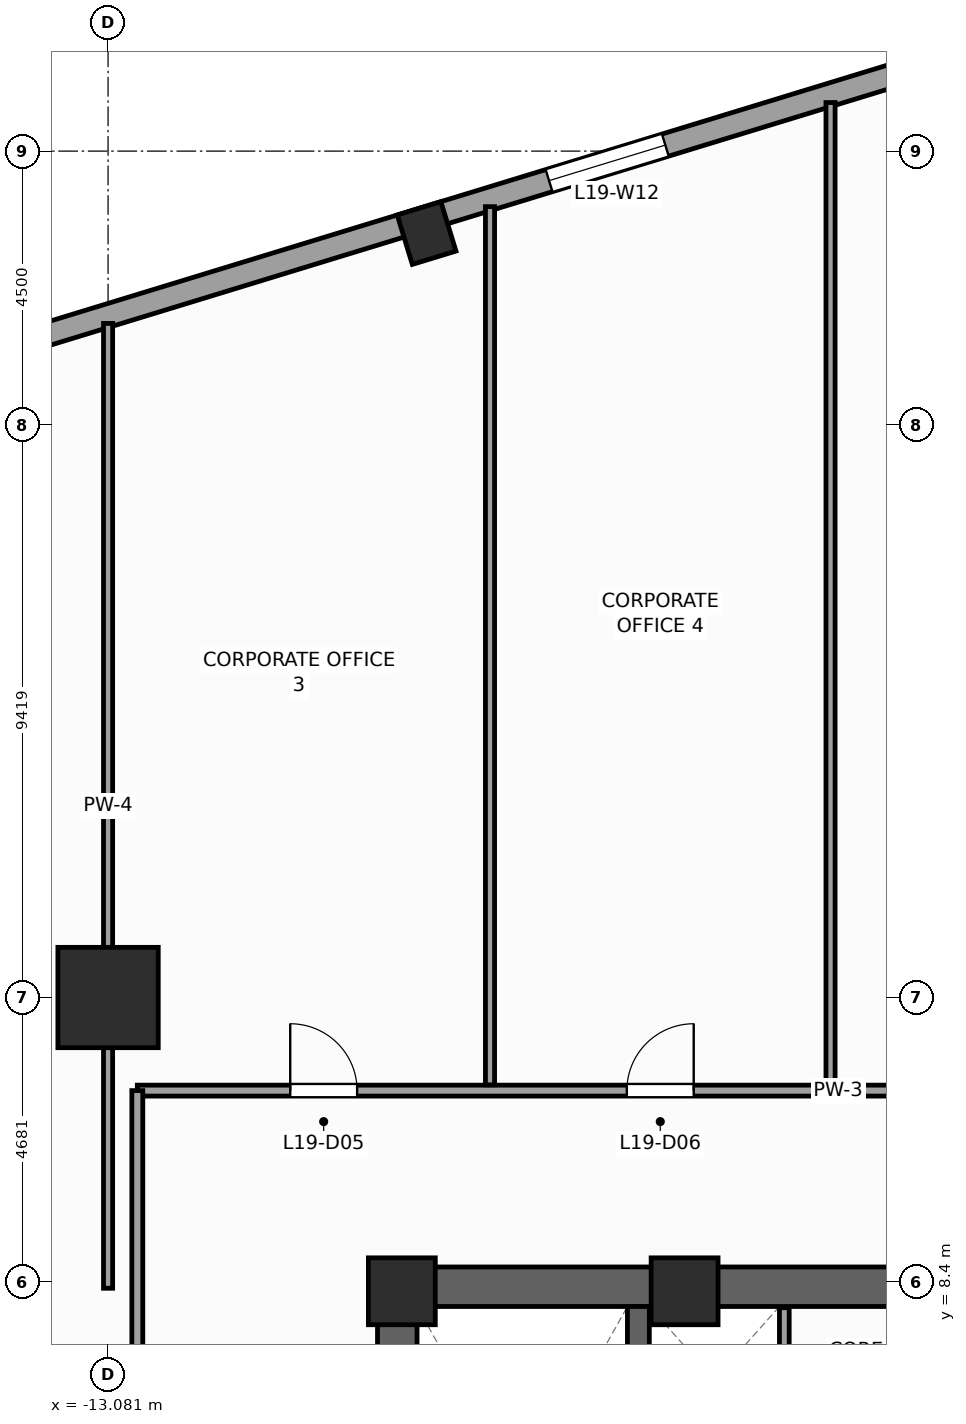
"""IFC4 building model, lengths in metres.
Left out: names, types, materials, properties, quantities, classifications, styles, units other than length and angle.
Written with IfcOpenShell. Run it as: python <this file> out.ifc"""

import sys

from ifc_helpers import new_model, si_unit, direction, frame, frame_2d, origin, origin_2d, place, context, subcontext, project, spatial, rectangle, extrude, source, transform, mapped, element, fill, save


model = new_model("IFC4")
c1 = context("Model", 3, precision=1e-05, world=origin(), true_north=direction((0.0, 1.0)))
c2 = subcontext(c1, "Body", "Model", "MODEL_VIEW")
j1 = project(units=[si_unit("LENGTHUNIT", "METRE"), si_unit("PLANEANGLEUNIT", "RADIAN")], contexts=[c1])
p1 = place(None, origin())
s1 = spatial("IfcSite", under=j1, at=p1, CompositionType="ELEMENT")
p2 = place(p1, origin())
s2 = spatial("IfcBuilding", under=s1, at=p2, CompositionType="ELEMENT")
p3 = place(p2, frame((0.0, 0.0, 83.2)))
s3 = spatial("IfcBuildingStorey", under=s2, at=p3, CompositionType="ELEMENT", Elevation=83.2)
p4 = place(p3, frame((-8.65, 8.325, 0.0), z_axis=(0.0, 0.0, 1.0), x_axis=(1.0, 0.0, 0.0)))
e1 = element("IfcWall", 1, at=p4, inside=s3, PredefinedType="SHEAR", context=c2, shape_type="SweptSolid", body=[
    extrude(rectangle(XDim=17.3, YDim=0.65, at=frame_2d((8.65, 0.0))), origin(), (0.0, 0.0, 1.0), 4.0),
])
p5 = place(p3, frame((-8.325, -8.0, 0.0), z_axis=(0.0, 0.0, 1.0), x_axis=(0.0, 1.0, 0.0)))
e2 = element("IfcWall", 2, at=p5, inside=s3, PredefinedType="SHEAR", context=c2, shape_type="SweptSolid", body=[
    extrude(rectangle(XDim=16.0, YDim=0.65, at=frame_2d((8.0, 0.0))), origin(), (0.0, 0.0, 1.0), 4.0),
])
p6 = place(p5, frame((4.69, 0.0, 0.0)))
e3 = element("IfcOpeningElement", 3, at=p6, cuts=e2, PredefinedType="OPENING", context=c2, shape_type="SweptSolid", body=[
    extrude(rectangle(XDim=1.3, YDim=2.2, at=frame_2d((0.65, 1.1))), frame((0.0, 0.335, 0.0), z_axis=(0.0, -1.0, 0.0), x_axis=(1.0, 0.0, 0.0)), (0.0, 0.0, 1.0), 0.67),
])
p7 = place(p3, frame((-4.36, -8.0, 0.0), z_axis=(0.0, 0.0, 1.0), x_axis=(0.0, 1.0, 0.0)))
e4 = element("IfcWall", 4, at=p7, inside=s3, PredefinedType="SHEAR", context=c2, shape_type="SweptSolid", body=[
    extrude(rectangle(XDim=16.0, YDim=0.36, at=frame_2d((8.0, 0.0))), origin(), (0.0, 0.0, 1.0), 4.0),
])
m1 = source(origin(), c2, "Body", "SweptSolid", [
    extrude(rectangle(XDim=1.1, YDim=1.1, at=origin_2d()), origin(), (0.0, 0.0, 1.0), 4.0),
])
for number, where, z_axis, x_axis in (
    (5, (-8.25, 8.25, 0.0), (0.0, 0.0, 1.0), (1.0, 0.0, 0.0)),
    (6, (-3.6, 8.25, 0.0), (0.0, 0.0, 1.0), (1.0, 0.0, 0.0)),
):
    element("IfcColumn", number, at=place(p3, frame(where, z_axis=z_axis, x_axis=x_axis)), inside=s3, PredefinedType="PILASTER", context=c2, shape_type="MappedRepresentation", body=[
        mapped(m1, transform((0.0, 0.0, 0.0), scale=1.0)),
    ])
m2 = source(origin(), c2, "Body", "SweptSolid", [
    extrude(rectangle(XDim=1.65, YDim=1.65, at=origin_2d()), origin(), (0.0, 0.0, 1.0), 4.0),
])
p8 = place(p3, frame((-13.081, 13.081, 0.0), z_axis=(0.0, 0.0, 1.0), x_axis=(1.0, 0.0, 0.0)))
e7 = element("IfcColumn", 7, at=p8, inside=s3, PredefinedType="COLUMN", context=c2, shape_type="MappedRepresentation", body=[
    mapped(m2, transform((0.0, 0.0, 0.0), scale=1.0)),
])
m3 = source(origin(), c2, "Body", "SweptSolid", [
    extrude(rectangle(XDim=0.75, YDim=0.85, at=origin_2d()), origin(), (0.0, 0.0, 1.0), 4.0),
])
p9 = place(p3, frame((-7.843, 25.653, 0.0), z_axis=(0.0, 0.0, 1.0), x_axis=(0.956304755963, 0.292371704723, 0.0)))
e8 = element("IfcColumn", 8, at=p9, inside=s3, PredefinedType="COLUMN", context=c2, shape_type="MappedRepresentation", body=[
    mapped(m3, transform((0.0, 0.0, 0.0), scale=1.0)),
])
p10 = place(p3, frame((14.265, 32.658, 0.0), z_axis=(0.0, 0.0, 1.0), x_axis=(-0.956304320851, -0.292373127906, 0.0)))
e9 = element("IfcWall", 9, at=p10, inside=s3, PredefinedType="STANDARD", context=c2, shape_type="SweptSolid", body=[
    extrude(rectangle(XDim=46.38, YDim=0.38, at=frame_2d((23.19, 0.0))), origin(), (0.0, 0.0, 1.0), 3.14),
])
p11 = place(p10, frame((4.865, 0.0, 0.51)))
e10 = element("IfcOpeningElement", 10, at=p11, cuts=e9, PredefinedType="OPENING", context=c2, shape_type="SweptSolid", body=[
    extrude(rectangle(XDim=1.4, YDim=2.4, at=frame_2d((0.7, 1.2))), frame((0.0, 0.2, 0.0), z_axis=(0.0, -1.0, 0.0), x_axis=(1.0, 0.0, 0.0)), (0.0, 0.0, 1.0), 0.4),
])
p12 = place(p10, frame((12.45, 0.0, 0.51)))
e11 = element("IfcOpeningElement", 11, at=p12, cuts=e9, PredefinedType="OPENING", context=c2, shape_type="SweptSolid", body=[
    extrude(rectangle(XDim=2.0, YDim=2.4, at=frame_2d((1.0, 1.2))), frame((0.0, 0.2, 0.0), z_axis=(0.0, -1.0, 0.0), x_axis=(1.0, 0.0, 0.0)), (0.0, 0.0, 1.0), 0.4),
])
p13 = place(p10, frame((19.012, 0.0, 0.51)))
e12 = element("IfcOpeningElement", 12, at=p13, cuts=e9, PredefinedType="OPENING", context=c2, shape_type="SweptSolid", body=[
    extrude(rectangle(XDim=2.0, YDim=2.4, at=frame_2d((1.0, 1.2))), frame((0.0, 0.2, 0.0), z_axis=(0.0, -1.0, 0.0), x_axis=(1.0, 0.0, 0.0)), (0.0, 0.0, 1.0), 0.4),
])
p14 = place(p10, frame((30.538, 0.0, 0.51)))
e13 = element("IfcOpeningElement", 13, at=p14, cuts=e9, PredefinedType="OPENING", context=c2, shape_type="SweptSolid", body=[
    extrude(rectangle(XDim=2.0, YDim=2.4, at=frame_2d((1.0, 1.2))), frame((0.0, 0.2, 0.0), z_axis=(0.0, -1.0, 0.0), x_axis=(1.0, 0.0, 0.0)), (0.0, 0.0, 1.0), 0.4),
])
p15 = place(p10, frame((39.187, 0.0, 0.51)))
e14 = element("IfcOpeningElement", 14, at=p15, cuts=e9, PredefinedType="OPENING", context=c2, shape_type="SweptSolid", body=[
    extrude(rectangle(XDim=1.4, YDim=2.4, at=frame_2d((0.7, 1.2))), frame((0.0, 0.2, 0.0), z_axis=(0.0, -1.0, 0.0), x_axis=(1.0, 0.0, 0.0)), (0.0, 0.0, 1.0), 0.4),
])
p16 = place(p3, frame((-1.96, 4.58, 0.0), z_axis=(0.0, 0.0, 1.0), x_axis=(0.0, 1.0, 0.0)))
e15 = element("IfcWall", 15, at=p16, inside=s3, PredefinedType="PARTITIONING", context=c2, shape_type="SweptSolid", body=[
    extrude(rectangle(XDim=3.4, YDim=0.16, at=frame_2d((1.7, 0.0))), origin(), (0.0, 0.0, 1.0), 3.74),
])
p17 = place(p3, frame((-12.6, 11.55, 0.0), z_axis=(0.0, 0.0, 1.0), x_axis=(1.0, 0.0, 0.0)))
e16 = element("IfcWall", 16, at=p17, inside=s3, PredefinedType="PARTITIONING", context=c2, shape_type="SweptSolid", body=[
    extrude(rectangle(XDim=23.05, YDim=0.18, at=frame_2d((11.525, 0.0))), origin(), (0.0, 0.0, 1.0), 3.74),
])
p18 = place(p17, frame((2.514, 0.0, 0.0)))
e17 = element("IfcOpeningElement", 17, at=p18, cuts=e16, PredefinedType="OPENING", context=c2, shape_type="SweptSolid", body=[
    extrude(rectangle(XDim=1.1, YDim=2.2, at=frame_2d((0.55, 1.1))), frame((0.0, 0.1, 0.0), z_axis=(0.0, -1.0, 0.0), x_axis=(1.0, 0.0, 0.0)), (0.0, 0.0, 1.0), 0.2),
])
p19 = place(p17, frame((8.05, 0.0, 0.0)))
e18 = element("IfcOpeningElement", 18, at=p19, cuts=e16, PredefinedType="OPENING", context=c2, shape_type="SweptSolid", body=[
    extrude(rectangle(XDim=1.1, YDim=2.2, at=frame_2d((0.55, 1.1))), frame((0.0, 0.1, 0.0), z_axis=(0.0, -1.0, 0.0), x_axis=(1.0, 0.0, 0.0)), (0.0, 0.0, 1.0), 0.2),
])
p20 = place(p17, frame((13.65, 0.0, 0.0)))
e19 = element("IfcOpeningElement", 19, at=p20, cuts=e16, PredefinedType="OPENING", context=c2, shape_type="SweptSolid", body=[
    extrude(rectangle(XDim=1.1, YDim=2.2, at=frame_2d((0.55, 1.1))), frame((0.0, 0.1, 0.0), z_axis=(0.0, -1.0, 0.0), x_axis=(1.0, 0.0, 0.0)), (0.0, 0.0, 1.0), 0.2),
])
p21 = place(p17, frame((19.311, 0.0, 0.0)))
e20 = element("IfcOpeningElement", 20, at=p21, cuts=e16, PredefinedType="OPENING", context=c2, shape_type="SweptSolid", body=[
    extrude(rectangle(XDim=1.1, YDim=2.2, at=frame_2d((0.55, 1.1))), frame((0.0, 0.1, 0.0), z_axis=(0.0, -1.0, 0.0), x_axis=(1.0, 0.0, 0.0)), (0.0, 0.0, 1.0), 0.2),
])
p22 = place(p3, frame((-12.6, 1.15, 0.0), z_axis=(0.0, 0.0, 1.0), x_axis=(0.0, 1.0, 0.0)))
e21 = element("IfcWall", 21, at=p22, inside=s3, PredefinedType="PARTITIONING", context=c2, shape_type="SweptSolid", body=[
    extrude(rectangle(XDim=10.4, YDim=0.18, at=frame_2d((5.2, 0.0))), origin(), (0.0, 0.0, 1.0), 3.74),
])
p23 = place(p22, frame((4.812, 0.0, 0.0)))
e22 = element("IfcOpeningElement", 22, at=p23, cuts=e21, PredefinedType="OPENING", context=c2, shape_type="SweptSolid", body=[
    extrude(rectangle(XDim=1.1, YDim=2.2, at=frame_2d((0.55, 1.1))), frame((0.0, 0.1, 0.0), z_axis=(0.0, -1.0, 0.0), x_axis=(1.0, 0.0, 0.0)), (0.0, 0.0, 1.0), 0.2),
])
p24 = place(p3, frame((-13.081, 8.3, 0.0), z_axis=(0.0, 0.0, 1.0), x_axis=(0.0, 1.0, 0.0)))
e23 = element("IfcWall", 23, at=p24, inside=s3, PredefinedType="PARTITIONING", context=c2, shape_type="SweptSolid", body=[
    extrude(rectangle(XDim=15.866, YDim=0.15, at=frame_2d((7.933, 0.0))), origin(), (0.0, 0.0, 1.0), 2.732),
])
p25 = place(p3, frame((-6.8, 11.645, 0.0), z_axis=(0.0, 0.0, 1.0), x_axis=(0.0, 1.0, 0.0)))
e24 = element("IfcWall", 24, at=p25, inside=s3, PredefinedType="PARTITIONING", context=c2, shape_type="SweptSolid", body=[
    extrude(rectangle(XDim=14.442, YDim=0.15, at=frame_2d((7.221, 0.0))), origin(), (0.0, 0.0, 1.0), 3.74),
])
p26 = place(p3, frame((-1.2, 11.645, 0.0), z_axis=(0.0, 0.0, 1.0), x_axis=(0.0, 1.0, 0.0)))
e25 = element("IfcWall", 25, at=p26, inside=s3, PredefinedType="PARTITIONING", context=c2, shape_type="SweptSolid", body=[
    extrude(rectangle(XDim=16.154, YDim=0.15, at=frame_2d((8.077, 0.0))), origin(), (0.0, 0.0, 1.0), 3.74),
])
m4 = source(origin(), c2, "Body", "SweptSolid", [
    extrude(rectangle(XDim=2.0, YDim=2.4, at=frame_2d((1.0, 1.2))), frame((0.0, 0.03, 0.0), z_axis=(0.0, -1.0, 0.0), x_axis=(1.0, 0.0, 0.0)), (0.0, 0.0, 1.0), 0.06),
])
p27 = place(p13, origin())
e26 = element("IfcWindow", 26, at=p27, inside=s3, PartitioningType="SINGLE_PANEL", PredefinedType="WINDOW", context=c2, shape_type="MappedRepresentation", body=[
    mapped(m4, transform((0.0, 0.0, 0.0), scale=1.0)),
])
fill(e12, e26)
m5 = source(origin(), c2, "Body", "SweptSolid", [
    extrude(rectangle(XDim=1.1, YDim=2.2, at=frame_2d((0.55, 1.1))), frame((0.0, 0.025, 0.0), z_axis=(0.0, -1.0, 0.0), x_axis=(1.0, 0.0, 0.0)), (0.0, 0.0, 1.0), 0.05),
])
p28 = place(p18, origin())
e27 = element("IfcDoor", 27, at=p28, inside=s3, OperationType="SINGLE_SWING_LEFT", PredefinedType="DOOR", context=c2, shape_type="MappedRepresentation", body=[
    mapped(m5, transform((0.0, 0.0, 0.0), scale=1.0)),
])
fill(e17, e27)
p29 = place(p19, origin())
e28 = element("IfcDoor", 28, at=p29, inside=s3, OperationType="SINGLE_SWING_RIGHT", PredefinedType="DOOR", context=c2, shape_type="MappedRepresentation", body=[
    mapped(m5, transform((0.0, 0.0, 0.0), scale=1.0)),
])
fill(e18, e28)
save(model, sys.argv[1])
